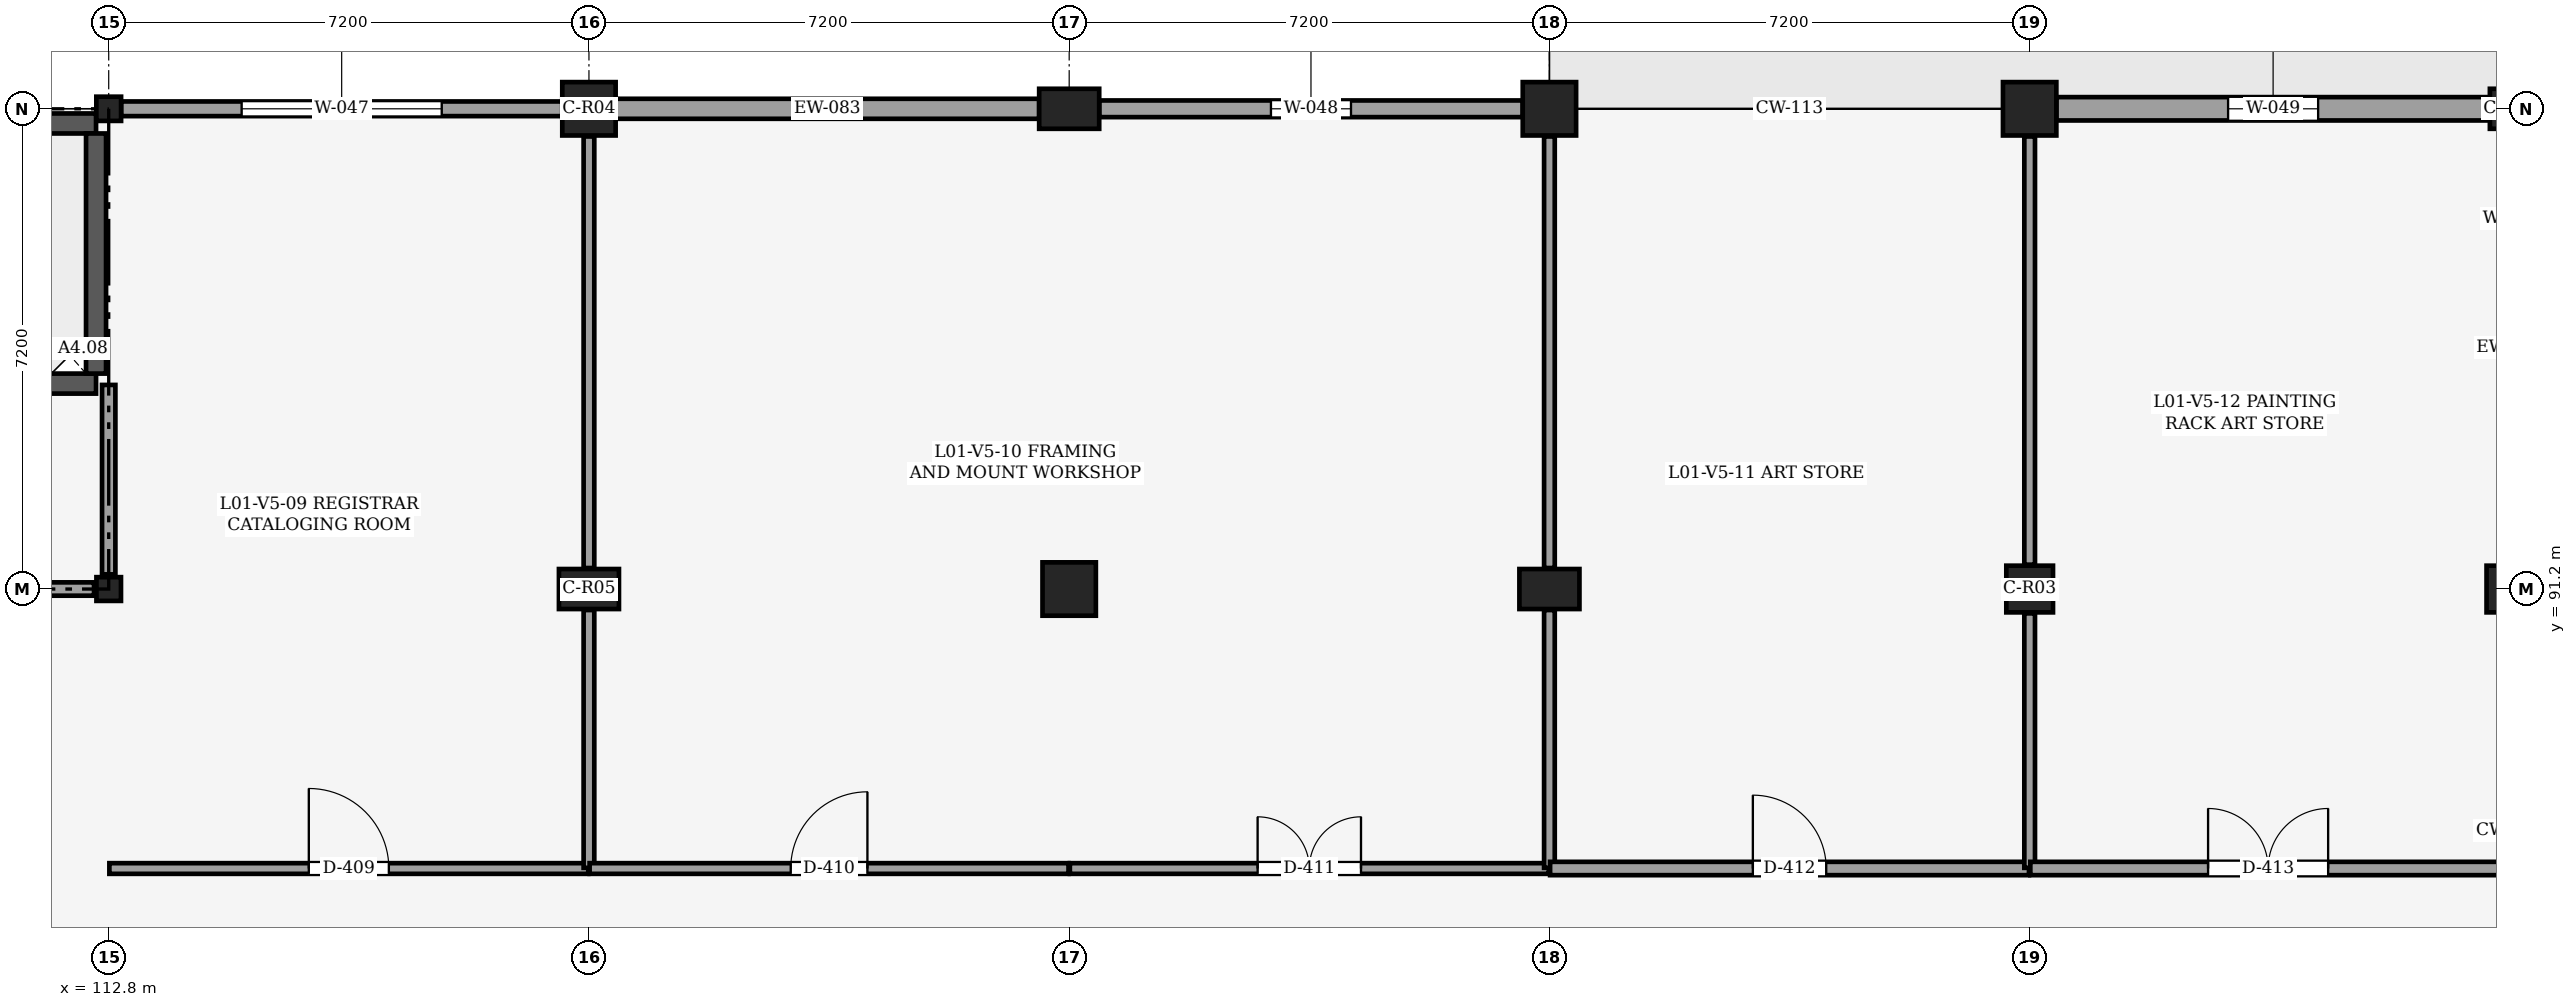
"""IFC4 building model, lengths in metres.
Left out: names, types, materials, properties, quantities, classifications, styles, units other than length and angle.
Written with IfcOpenShell. Run it as: python <this file> out.ifc"""

import sys

from ifc_helpers import new_model, si_unit, direction, frame, frame_2d, origin, origin_2d, place, context, subcontext, project, spatial, rectangle, i_section, extrude, element, fill, save


model = new_model("IFC4")
c1 = context("Model", 3, precision=1e-05, world=origin(), true_north=direction((0.0, 1.0)))
c2 = subcontext(c1, "Body", "Model", "MODEL_VIEW")
j1 = project(units=[si_unit("LENGTHUNIT", "METRE"), si_unit("PLANEANGLEUNIT", "RADIAN")], contexts=[c1])
p1 = place(None, origin())
s1 = spatial("IfcSite", under=j1, at=p1, CompositionType="ELEMENT")
p2 = place(p1, origin())
s2 = spatial("IfcBuilding", under=s1, at=p2, CompositionType="ELEMENT")
p3 = place(p2, frame((0.0, 0.0, 5.4)))
s3 = spatial("IfcBuildingStorey", under=s2, at=p3, CompositionType="ELEMENT", Elevation=5.4)
p4 = place(p3, frame((112.8, 91.2, 0.0), z_axis=(0.0, 0.0, 1.0), x_axis=(1.0, 0.0, 0.0)))
e1 = element("IfcColumn", 1, at=p4, inside=s3, PredefinedType="COLUMN", context=c2, shape_type="SweptSolid", body=[
    extrude(i_section(OverallWidth=0.368, OverallDepth=0.356, WebThickness=0.011, FlangeThickness=0.018, FilletRadius=0.025, at=origin_2d()), origin(), (0.0, 0.0, 1.0), 4.8),
])
p5 = place(p3, frame((112.8, 98.4, 0.0), z_axis=(0.0, 0.0, 1.0), x_axis=(1.0, 0.0, 0.0)))
e2 = element("IfcColumn", 2, at=p5, inside=s3, PredefinedType="COLUMN", context=c2, shape_type="SweptSolid", body=[
    extrude(i_section(OverallWidth=0.371, OverallDepth=0.363, WebThickness=0.013, FlangeThickness=0.022, FilletRadius=0.025, at=origin_2d()), origin(), (0.0, 0.0, 1.0), 4.8),
])
p6 = place(p3, frame((120.0, 91.2, 0.0), z_axis=(0.0, 0.0, 1.0), x_axis=(1.0, 0.0, 0.0)))
e3 = element("IfcColumn", 3, at=p6, inside=s3, PredefinedType="COLUMN", context=c2, shape_type="SweptSolid", body=[
    extrude(rectangle(XDim=0.9, YDim=0.6, at=origin_2d()), origin(), (0.0, 0.0, 1.0), 4.8),
])
for number, where, z_axis, x_axis in (
    (4, (120.0, 98.4, 0.0), (0.0, 0.0, 1.0), (1.0, 0.0, 0.0)),
    (5, (127.2, 91.2, 0.0), (0.0, 0.0, 1.0), (1.0, 0.0, 0.0)),
):
    element("IfcColumn", number, at=place(p3, frame(where, z_axis=z_axis, x_axis=x_axis)), inside=s3, PredefinedType="COLUMN", context=c2, shape_type="SweptSolid", body=[
        extrude(rectangle(XDim=0.8, YDim=0.8, at=origin_2d()), origin(), (0.0, 0.0, 1.0), 4.8),
    ])
for number, where, z_axis, x_axis in (
    (6, (127.2, 98.4, 0.0), (0.0, 0.0, 1.0), (1.0, 0.0, 0.0)),
    (7, (134.4, 91.2, 0.0), (0.0, 0.0, 1.0), (1.0, 0.0, 0.0)),
):
    element("IfcColumn", number, at=place(p3, frame(where, z_axis=z_axis, x_axis=x_axis)), inside=s3, PredefinedType="COLUMN", context=c2, shape_type="SweptSolid", body=[
        extrude(rectangle(XDim=0.9, YDim=0.6, at=origin_2d()), origin(), (0.0, 0.0, 1.0), 4.8),
    ])
p7 = place(p3, frame((134.4, 98.4, 0.0), z_axis=(0.0, 0.0, 1.0), x_axis=(1.0, 0.0, 0.0)))
e8 = element("IfcColumn", 8, at=p7, inside=s3, PredefinedType="COLUMN", context=c2, shape_type="SweptSolid", body=[
    extrude(rectangle(XDim=0.8, YDim=0.8, at=origin_2d()), origin(), (0.0, 0.0, 1.0), 4.8),
])
p8 = place(p3, frame((141.6, 91.2, 0.0), z_axis=(0.0, 0.0, 1.0), x_axis=(1.0, 0.0, 0.0)))
e9 = element("IfcColumn", 9, at=p8, inside=s3, PredefinedType="COLUMN", context=c2, shape_type="SweptSolid", body=[
    extrude(rectangle(XDim=0.7, YDim=0.7, at=origin_2d()), origin(), (0.0, 0.0, 1.0), 4.8),
])
p9 = place(p3, frame((141.6, 98.4, 0.0), z_axis=(0.0, 0.0, 1.0), x_axis=(1.0, 0.0, 0.0)))
e10 = element("IfcColumn", 10, at=p9, inside=s3, PredefinedType="COLUMN", context=c2, shape_type="SweptSolid", body=[
    extrude(rectangle(XDim=0.8, YDim=0.8, at=origin_2d()), origin(), (0.0, 0.0, 1.0), 4.8),
])
p10 = place(p3, frame((148.8, 91.2, 0.0), z_axis=(0.0, 0.0, 1.0), x_axis=(1.0, 0.0, 0.0)))
e11 = element("IfcColumn", 11, at=p10, inside=s3, PredefinedType="COLUMN", context=c2, shape_type="SweptSolid", body=[
    extrude(rectangle(XDim=0.7, YDim=0.7, at=origin_2d()), origin(), (0.0, 0.0, 1.0), 4.8),
])
p11 = place(p3, frame((148.8, 98.4, 0.0), z_axis=(0.0, 0.0, 1.0), x_axis=(1.0, 0.0, 0.0)))
e12 = element("IfcColumn", 12, at=p11, inside=s3, PredefinedType="COLUMN", context=c2, shape_type="SweptSolid", body=[
    extrude(rectangle(XDim=0.6, YDim=0.6, at=origin_2d()), origin(), (0.0, 0.0, 1.0), 4.8),
])
p12 = place(p3, frame((112.986, 98.4, 0.0), z_axis=(0.0, 0.0, 1.0), x_axis=(1.0, 0.0, 0.0)))
e13 = element("IfcWall", 13, at=p12, inside=s3, PredefinedType="SOLIDWALL", context=c2, shape_type="SweptSolid", body=[
    extrude(rectangle(XDim=6.615, YDim=0.22, at=frame_2d((3.307, 0.0))), origin(), (0.0, 0.0, 1.0), 4.164),
])
p13 = place(p12, frame((1.807, 0.0, 0.85)))
e14 = element("IfcOpeningElement", 14, at=p13, cuts=e13, PredefinedType="OPENING", context=c2, shape_type="SweptSolid", body=[
    extrude(rectangle(XDim=3.0, YDim=1.9, at=frame_2d((1.5, 0.95))), frame((0.0, 0.12, 0.0), z_axis=(0.0, -1.0, 0.0), x_axis=(1.0, 0.0, 0.0)), (0.0, 0.0, 1.0), 0.24),
])
p14 = place(p3, frame((120.4, 98.4, 0.0), z_axis=(0.0, 0.0, 1.0), x_axis=(1.0, 0.0, 0.0)))
e15 = element("IfcWall", 15, at=p14, inside=s3, PredefinedType="SOLIDWALL", context=c2, shape_type="SweptSolid", body=[
    extrude(rectangle(XDim=6.35, YDim=0.3, at=frame_2d((3.175, 0.0))), origin(), (0.0, 0.0, 1.0), 4.058),
])
p15 = place(p3, frame((127.65, 98.4, 0.0), z_axis=(0.0, 0.0, 1.0), x_axis=(1.0, 0.0, 0.0)))
e16 = element("IfcWall", 16, at=p15, inside=s3, PredefinedType="SOLIDWALL", context=c2, shape_type="SweptSolid", body=[
    extrude(rectangle(XDim=6.35, YDim=0.25, at=frame_2d((3.175, 0.0))), origin(), (0.0, 0.0, 1.0), 3.913),
])
p16 = place(p15, frame((2.575, 0.0, 0.9)))
e17 = element("IfcOpeningElement", 17, at=p16, cuts=e16, PredefinedType="OPENING", context=c2, shape_type="SweptSolid", body=[
    extrude(rectangle(XDim=1.2, YDim=1.5, at=frame_2d((0.6, 0.75))), frame((0.0, 0.135, 0.0), z_axis=(0.0, -1.0, 0.0), x_axis=(1.0, 0.0, 0.0)), (0.0, 0.0, 1.0), 0.271),
])
p17 = place(p3, frame((142.0, 98.4, 0.0), z_axis=(0.0, 0.0, 1.0), x_axis=(1.0, 0.0, 0.0)))
e18 = element("IfcWall", 18, at=p17, inside=s3, PredefinedType="SOLIDWALL", context=c2, shape_type="SweptSolid", body=[
    extrude(rectangle(XDim=6.5, YDim=0.35, at=frame_2d((3.25, 0.0))), origin(), (0.0, 0.0, 1.0), 3.987),
])
p18 = place(p17, frame((2.575, 0.0, 0.9)))
e19 = element("IfcOpeningElement", 19, at=p18, cuts=e18, PredefinedType="OPENING", context=c2, shape_type="SweptSolid", body=[
    extrude(rectangle(XDim=1.35, YDim=1.5, at=frame_2d((0.675, 0.75))), frame((0.0, 0.185, 0.0), z_axis=(0.0, -1.0, 0.0), x_axis=(1.0, 0.0, 0.0)), (0.0, 0.0, 1.0), 0.371),
])
p19 = place(p3, frame((104.59, 94.28, 0.0), z_axis=(0.0, 0.0, 1.0), x_axis=(1.0, 0.0, 0.0)))
e20 = element("IfcWall", 20, at=p19, inside=s3, PredefinedType="SHEAR", context=c2, shape_type="SweptSolid", body=[
    extrude(rectangle(XDim=8.02, YDim=0.3, at=frame_2d((4.01, 0.0))), origin(), (0.0, 0.0, 1.0), 4.54),
])
p20 = place(p19, frame((0.45, 0.0, 0.0)))
e21 = element("IfcOpeningElement", 21, at=p20, cuts=e20, PredefinedType="OPENING", context=c2, shape_type="SweptSolid", body=[
    extrude(rectangle(XDim=1.1, YDim=2.15, at=frame_2d((0.55, 1.075))), frame((0.0, 0.16, 0.0), z_axis=(0.0, -1.0, 0.0), x_axis=(1.0, 0.0, 0.0)), (0.0, 0.0, 1.0), 0.321),
])
p21 = place(p3, frame((104.59, 98.18, 0.0), z_axis=(0.0, 0.0, 1.0), x_axis=(1.0, 0.0, 0.0)))
e22 = element("IfcWall", 22, at=p21, inside=s3, PredefinedType="SHEAR", context=c2, shape_type="SweptSolid", body=[
    extrude(rectangle(XDim=8.02, YDim=0.3, at=frame_2d((4.01, 0.0))), origin(), (0.0, 0.0, 1.0), 4.54),
])
p22 = place(p3, frame((112.61, 94.43, 0.0), z_axis=(0.0, 0.0, 1.0), x_axis=(0.0, 1.0, 0.0)))
e23 = element("IfcWall", 23, at=p22, inside=s3, PredefinedType="SHEAR", context=c2, shape_type="SweptSolid", body=[
    extrude(rectangle(XDim=3.6, YDim=0.3, at=frame_2d((1.8, 0.0))), origin(), (0.0, 0.0, 1.0), 4.54),
])
p23 = place(p3, frame((112.8, 91.42, 0.0), z_axis=(0.0, 0.0, 1.0), x_axis=(0.0, 1.0, 0.0)))
e24 = element("IfcWall", 24, at=p23, inside=s3, PredefinedType="PARTITIONING", context=c2, shape_type="SweptSolid", body=[
    extrude(rectangle(XDim=2.84, YDim=0.2, at=frame_2d((1.42, 0.0))), origin(), (0.0, 0.0, 1.0), 3.913),
])
p24 = place(p3, frame((104.62, 91.2, 0.0), z_axis=(0.0, 0.0, 1.0), x_axis=(1.0, 0.0, 0.0)))
e25 = element("IfcWall", 25, at=p24, inside=s3, PredefinedType="PARTITIONING", context=c2, shape_type="SweptSolid", body=[
    extrude(rectangle(XDim=7.96, YDim=0.2, at=frame_2d((3.98, 0.0))), origin(), (0.0, 0.0, 1.0), 3.827),
])
p25 = place(p24, frame((3.255, 0.0, 0.0)))
e26 = element("IfcOpeningElement", 26, at=p25, cuts=e25, PredefinedType="OPENING", context=c2, shape_type="SweptSolid", body=[
    extrude(rectangle(XDim=1.45, YDim=2.2, at=frame_2d((0.725, 1.1))), frame((0.0, 0.11, 0.0), z_axis=(0.0, -1.0, 0.0), x_axis=(1.0, 0.0, 0.0)), (0.0, 0.0, 1.0), 0.22),
])
p26 = place(p3, frame((112.81, 87.01, 0.0), z_axis=(0.0, 0.0, 1.0), x_axis=(1.0, 0.0, 0.0)))
e27 = element("IfcWall", 27, at=p26, inside=s3, PredefinedType="PARTITIONING", context=c2, shape_type="SweptSolid", body=[
    extrude(rectangle(XDim=7.18, YDim=0.16, at=frame_2d((3.59, 0.0))), origin(), (0.0, 0.0, 1.0), 4.52),
])
p27 = place(p26, frame((2.99, 0.0, 0.0)))
e28 = element("IfcOpeningElement", 28, at=p27, cuts=e27, PredefinedType="OPENING", context=c2, shape_type="SweptSolid", body=[
    extrude(rectangle(XDim=1.2, YDim=2.2, at=frame_2d((0.6, 1.1))), frame((0.0, 0.09, 0.0), z_axis=(0.0, -1.0, 0.0), x_axis=(1.0, 0.0, 0.0)), (0.0, 0.0, 1.0), 0.18),
])
p28 = place(p3, frame((120.0, 87.02, 0.0), z_axis=(0.0, 0.0, 1.0), x_axis=(0.0, 1.0, 0.0)))
e29 = element("IfcWall", 29, at=p28, inside=s3, PredefinedType="PARTITIONING", context=c2, shape_type="SweptSolid", body=[
    extrude(rectangle(XDim=3.865, YDim=0.16, at=frame_2d((1.933, 0.0))), origin(), (0.0, 0.0, 1.0), 3.913),
])
p29 = place(p3, frame((120.0, 91.515, 0.0), z_axis=(0.0, 0.0, 1.0), x_axis=(0.0, 1.0, 0.0)))
e30 = element("IfcWall", 30, at=p29, inside=s3, PredefinedType="PARTITIONING", context=c2, shape_type="SweptSolid", body=[
    extrude(rectangle(XDim=6.47, YDim=0.16, at=frame_2d((3.235, 0.0))), origin(), (0.0, 0.0, 1.0), 3.987),
])
p30 = place(p3, frame((120.01, 87.01, 0.0), z_axis=(0.0, 0.0, 1.0), x_axis=(1.0, 0.0, 0.0)))
e31 = element("IfcWall", 31, at=p30, inside=s3, PredefinedType="PARTITIONING", context=c2, shape_type="SweptSolid", body=[
    extrude(rectangle(XDim=7.18, YDim=0.16, at=frame_2d((3.59, 0.0))), origin(), (0.0, 0.0, 1.0), 4.52),
])
p31 = place(p30, frame((3.015, 0.0, 0.0)))
e32 = element("IfcOpeningElement", 32, at=p31, cuts=e31, PredefinedType="OPENING", context=c2, shape_type="SweptSolid", body=[
    extrude(rectangle(XDim=1.15, YDim=2.2, at=frame_2d((0.575, 1.1))), frame((0.0, 0.09, 0.0), z_axis=(0.0, -1.0, 0.0), x_axis=(1.0, 0.0, 0.0)), (0.0, 0.0, 1.0), 0.18),
])
p32 = place(p3, frame((127.21, 87.01, 0.0), z_axis=(0.0, 0.0, 1.0), x_axis=(1.0, 0.0, 0.0)))
e33 = element("IfcWall", 33, at=p32, inside=s3, PredefinedType="PARTITIONING", context=c2, shape_type="SweptSolid", body=[
    extrude(rectangle(XDim=7.18, YDim=0.16, at=frame_2d((3.59, 0.0))), origin(), (0.0, 0.0, 1.0), 4.52),
])
p33 = place(p32, frame((2.815, 0.0, 0.0)))
e34 = element("IfcOpeningElement", 34, at=p33, cuts=e33, PredefinedType="OPENING", context=c2, shape_type="SweptSolid", body=[
    extrude(rectangle(XDim=1.55, YDim=2.3, at=frame_2d((0.775, 1.15))), frame((0.0, 0.09, 0.0), z_axis=(0.0, -1.0, 0.0), x_axis=(1.0, 0.0, 0.0)), (0.0, 0.0, 1.0), 0.18),
])
p34 = place(p3, frame((134.4, 87.02, 0.0), z_axis=(0.0, 0.0, 1.0), x_axis=(0.0, 1.0, 0.0)))
e35 = element("IfcWall", 35, at=p34, inside=s3, PredefinedType="PARTITIONING", context=c2, shape_type="SweptSolid", body=[
    extrude(rectangle(XDim=3.865, YDim=0.16, at=frame_2d((1.933, 0.0))), origin(), (0.0, 0.0, 1.0), 4.058),
])
p35 = place(p3, frame((134.4, 91.515, 0.0), z_axis=(0.0, 0.0, 1.0), x_axis=(0.0, 1.0, 0.0)))
e36 = element("IfcWall", 36, at=p35, inside=s3, PredefinedType="PARTITIONING", context=c2, shape_type="SweptSolid", body=[
    extrude(rectangle(XDim=6.47, YDim=0.16, at=frame_2d((3.235, 0.0))), origin(), (0.0, 0.0, 1.0), 3.908),
])
p36 = place(p3, frame((134.41, 87.01, 0.0), z_axis=(0.0, 0.0, 1.0), x_axis=(1.0, 0.0, 0.0)))
e37 = element("IfcWall", 37, at=p36, inside=s3, PredefinedType="PARTITIONING", context=c2, shape_type="SweptSolid", body=[
    extrude(rectangle(XDim=7.18, YDim=0.2, at=frame_2d((3.59, 0.0))), origin(), (0.0, 0.0, 1.0), 4.52),
])
p37 = place(p36, frame((3.04, 0.0, 0.0)))
e38 = element("IfcOpeningElement", 38, at=p37, cuts=e37, PredefinedType="OPENING", context=c2, shape_type="SweptSolid", body=[
    extrude(rectangle(XDim=1.1, YDim=2.15, at=frame_2d((0.55, 1.075))), frame((0.0, 0.11, 0.0), z_axis=(0.0, -1.0, 0.0), x_axis=(1.0, 0.0, 0.0)), (0.0, 0.0, 1.0), 0.22),
])
p38 = place(p3, frame((141.6, 87.02, 0.0), z_axis=(0.0, 0.0, 1.0), x_axis=(0.0, 1.0, 0.0)))
e39 = element("IfcWall", 39, at=p38, inside=s3, PredefinedType="PARTITIONING", context=c2, shape_type="SweptSolid", body=[
    extrude(rectangle(XDim=3.815, YDim=0.16, at=frame_2d((1.907, 0.0))), origin(), (0.0, 0.0, 1.0), 3.908),
])
p39 = place(p3, frame((141.6, 91.565, 0.0), z_axis=(0.0, 0.0, 1.0), x_axis=(0.0, 1.0, 0.0)))
e40 = element("IfcWall", 40, at=p39, inside=s3, PredefinedType="PARTITIONING", context=c2, shape_type="SweptSolid", body=[
    extrude(rectangle(XDim=6.42, YDim=0.16, at=frame_2d((3.21, 0.0))), origin(), (0.0, 0.0, 1.0), 3.913),
])
p40 = place(p3, frame((141.61, 87.01, 0.0), z_axis=(0.0, 0.0, 1.0), x_axis=(1.0, 0.0, 0.0)))
e41 = element("IfcWall", 41, at=p40, inside=s3, PredefinedType="PARTITIONING", context=c2, shape_type="SweptSolid", body=[
    extrude(rectangle(XDim=7.13, YDim=0.2, at=frame_2d((3.565, 0.0))), origin(), (0.0, 0.0, 1.0), 4.52),
])
p41 = place(p40, frame((2.665, 0.0, 0.0)))
e42 = element("IfcOpeningElement", 42, at=p41, cuts=e41, PredefinedType="OPENING", context=c2, shape_type="SweptSolid", body=[
    extrude(rectangle(XDim=1.8, YDim=2.4, at=frame_2d((0.9, 1.2))), frame((0.0, 0.11, 0.0), z_axis=(0.0, -1.0, 0.0), x_axis=(1.0, 0.0, 0.0)), (0.0, 0.0, 1.0), 0.22),
])
p42 = place(p13, origin())
e43 = element("IfcWindow", 43, at=p42, inside=s3, PartitioningType="SINGLE_PANEL", PredefinedType="WINDOW", context=c2, shape_type="SweptSolid", body=[
    extrude(rectangle(XDim=3.0, YDim=1.9, at=frame_2d((1.5, 0.95))), frame((0.0, 0.03, 0.0), z_axis=(0.0, -1.0, 0.0), x_axis=(1.0, 0.0, 0.0)), (0.0, 0.0, 1.0), 0.06),
])
fill(e14, e43)
p43 = place(p16, origin())
e44 = element("IfcWindow", 44, at=p43, inside=s3, PartitioningType="SINGLE_PANEL", PredefinedType="WINDOW", context=c2, shape_type="SweptSolid", body=[
    extrude(rectangle(XDim=1.2, YDim=1.5, at=frame_2d((0.6, 0.75))), frame((0.0, 0.03, 0.0), z_axis=(0.0, -1.0, 0.0), x_axis=(1.0, 0.0, 0.0)), (0.0, 0.0, 1.0), 0.06),
])
fill(e17, e44)
p44 = place(p18, origin())
e45 = element("IfcWindow", 45, at=p44, inside=s3, PartitioningType="SINGLE_PANEL", PredefinedType="WINDOW", context=c2, shape_type="SweptSolid", body=[
    extrude(rectangle(XDim=1.35, YDim=1.5, at=frame_2d((0.675, 0.75))), frame((0.0, 0.03, 0.0), z_axis=(0.0, -1.0, 0.0), x_axis=(1.0, 0.0, 0.0)), (0.0, 0.0, 1.0), 0.06),
])
fill(e19, e45)
p45 = place(p27, origin())
e46 = element("IfcDoor", 46, at=p45, inside=s3, OperationType="SINGLE_SWING_LEFT", PredefinedType="DOOR", context=c2, shape_type="SweptSolid", body=[
    extrude(rectangle(XDim=1.2, YDim=2.2, at=frame_2d((0.6, 1.1))), frame((0.0, 0.025, 0.0), z_axis=(0.0, -1.0, 0.0), x_axis=(1.0, 0.0, 0.0)), (0.0, 0.0, 1.0), 0.05),
])
fill(e28, e46)
p46 = place(p31, origin())
e47 = element("IfcDoor", 47, at=p46, inside=s3, OperationType="SINGLE_SWING_RIGHT", PredefinedType="DOOR", context=c2, shape_type="SweptSolid", body=[
    extrude(rectangle(XDim=1.15, YDim=2.2, at=frame_2d((0.575, 1.1))), frame((0.0, 0.025, 0.0), z_axis=(0.0, -1.0, 0.0), x_axis=(1.0, 0.0, 0.0)), (0.0, 0.0, 1.0), 0.05),
])
fill(e32, e47)
p47 = place(p33, origin())
e48 = element("IfcDoor", 48, at=p47, inside=s3, OperationType="DOUBLE_DOOR_SINGLE_SWING", PredefinedType="DOOR", context=c2, shape_type="SweptSolid", body=[
    extrude(rectangle(XDim=1.55, YDim=2.3, at=frame_2d((0.775, 1.15))), frame((0.0, 0.025, 0.0), z_axis=(0.0, -1.0, 0.0), x_axis=(1.0, 0.0, 0.0)), (0.0, 0.0, 1.0), 0.05),
])
fill(e34, e48)
p48 = place(p37, origin())
e49 = element("IfcDoor", 49, at=p48, inside=s3, OperationType="SINGLE_SWING_LEFT", PredefinedType="DOOR", context=c2, shape_type="SweptSolid", body=[
    extrude(rectangle(XDim=1.1, YDim=2.15, at=frame_2d((0.55, 1.075))), frame((0.0, 0.025, 0.0), z_axis=(0.0, -1.0, 0.0), x_axis=(1.0, 0.0, 0.0)), (0.0, 0.0, 1.0), 0.05),
])
fill(e38, e49)
p49 = place(p41, origin())
e50 = element("IfcDoor", 50, at=p49, inside=s3, OperationType="DOUBLE_DOOR_SINGLE_SWING", PredefinedType="DOOR", context=c2, shape_type="SweptSolid", body=[
    extrude(rectangle(XDim=1.8, YDim=2.4, at=frame_2d((0.9, 1.2))), frame((0.0, 0.025, 0.0), z_axis=(0.0, -1.0, 0.0), x_axis=(1.0, 0.0, 0.0)), (0.0, 0.0, 1.0), 0.05),
])
fill(e42, e50)
save(model, sys.argv[1])
